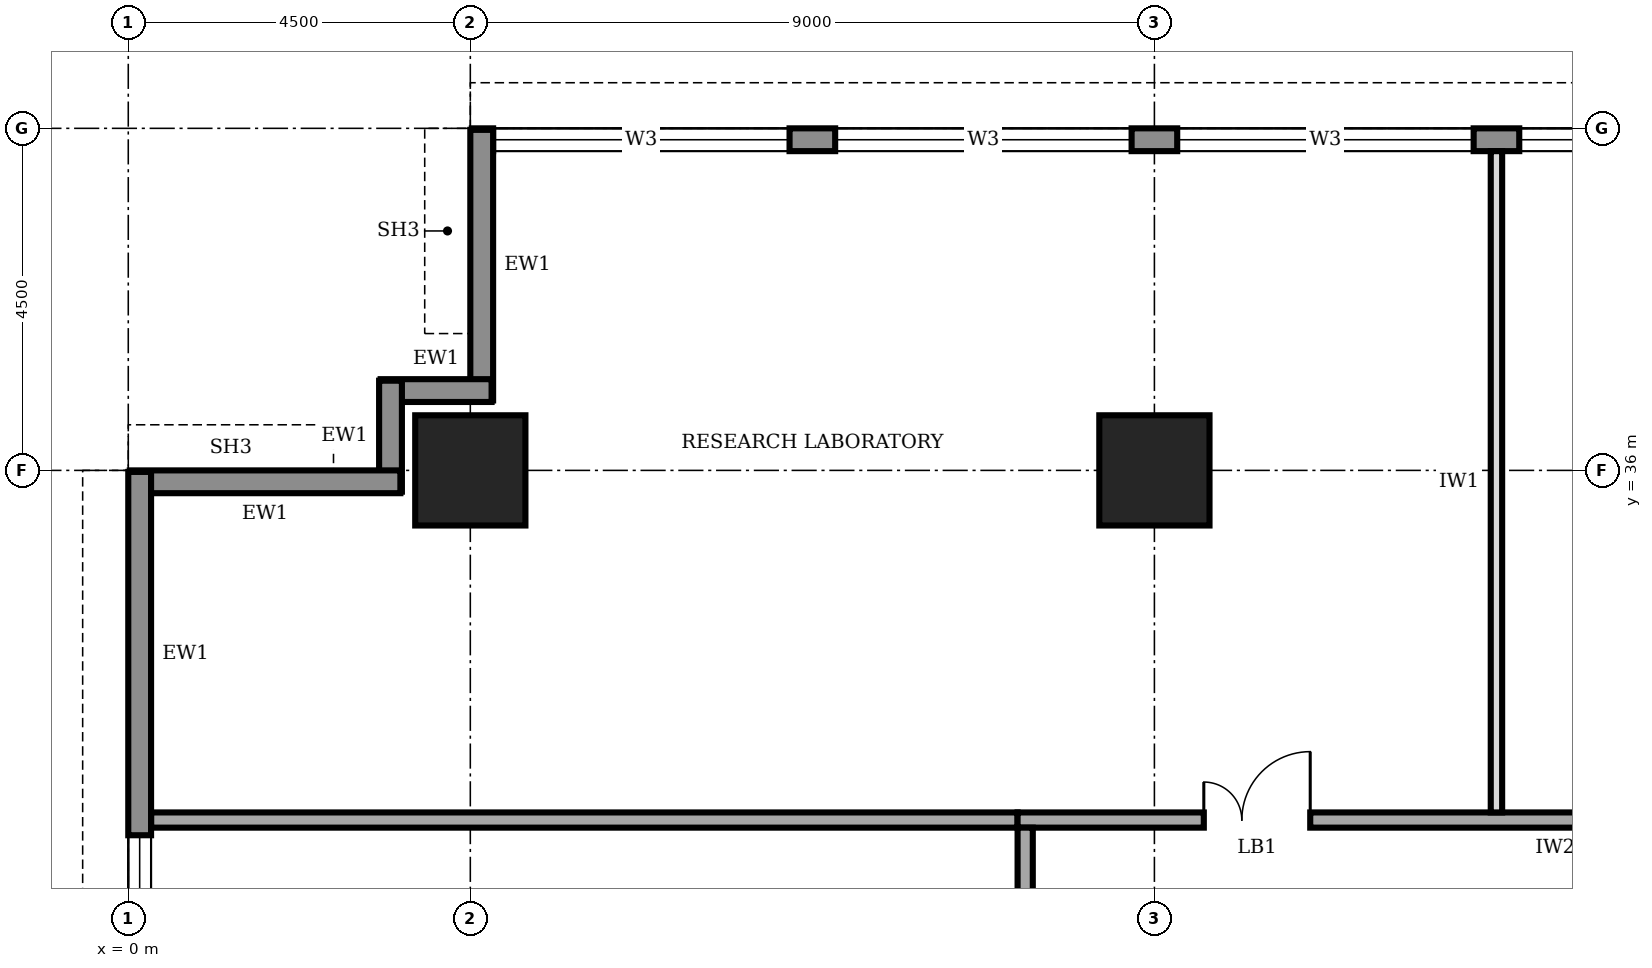
"""IFC4 building model, lengths in metres.
Left out: names, types, materials, properties, quantities, classifications, styles, units other than length and angle.
Written with IfcOpenShell. Run it as: python <this file> out.ifc"""

import sys

from ifc_helpers import new_model, si_unit, direction, frame, frame_2d, origin, origin_2d, place, context, subcontext, project, spatial, rectangle, extrude, element, fill, save


model = new_model("IFC4")
c1 = context("Model", 3, precision=1e-05, world=origin(), true_north=direction((0.0, 1.0)))
c2 = subcontext(c1, "Body", "Model", "MODEL_VIEW")
j1 = project(units=[si_unit("LENGTHUNIT", "METRE"), si_unit("PLANEANGLEUNIT", "RADIAN")], contexts=[c1])
p1 = place(None, origin())
s1 = spatial("IfcSite", under=j1, at=p1, CompositionType="ELEMENT")
p2 = place(p1, origin())
s2 = spatial("IfcBuilding", under=s1, at=p2, CompositionType="ELEMENT")
p3 = place(p2, frame((0.0, 0.0, 265.0)))
s3 = spatial("IfcBuildingStorey", under=s2, at=p3, CompositionType="ELEMENT", Elevation=265.0)
for number, where, z_axis, x_axis in (
    (1, (4.5, 36.0, 0.0), (0.0, 0.0, 1.0), (1.0, 0.0, 0.0)),
    (2, (13.5, 36.0, 0.0), (0.0, 0.0, 1.0), (1.0, 0.0, 0.0)),
):
    element("IfcColumn", number, at=place(p3, frame(where, z_axis=z_axis, x_axis=x_axis)), inside=s3, PredefinedType="COLUMN", context=c2, shape_type="SweptSolid", body=[
        extrude(rectangle(XDim=1.45, YDim=1.45, at=origin_2d()), origin(), (0.0, 0.0, 1.0), 4.0),
    ])
p4 = place(p3, frame((35.98, 40.35, 0.0), z_axis=(0.0, 0.0, 1.0), x_axis=(-1.0, 0.0, 0.0)))
e3 = element("IfcWall", 3, at=p4, inside=s3, PredefinedType="STANDARD", context=c2, shape_type="SweptSolid", body=[
    extrude(rectangle(XDim=31.46, YDim=0.3, at=frame_2d((15.73, 0.0))), origin(), (0.0, 0.0, 1.0), 3.75),
])
p5 = place(p4, frame((27.28, 0.0, 0.95)))
e4 = element("IfcOpeningElement", 4, at=p5, cuts=e3, PredefinedType="OPENING", context=c2, shape_type="SweptSolid", body=[
    extrude(rectangle(XDim=3.9, YDim=1.8, at=frame_2d((1.95, 0.9))), frame((0.0, 0.16, 0.0), z_axis=(0.0, -1.0, 0.0), x_axis=(1.0, 0.0, 0.0)), (0.0, 0.0, 1.0), 0.32),
])
p6 = place(p4, frame((22.78, 0.0, 0.95)))
e5 = element("IfcOpeningElement", 5, at=p6, cuts=e3, PredefinedType="OPENING", context=c2, shape_type="SweptSolid", body=[
    extrude(rectangle(XDim=3.9, YDim=1.8, at=frame_2d((1.95, 0.9))), frame((0.0, 0.16, 0.0), z_axis=(0.0, -1.0, 0.0), x_axis=(1.0, 0.0, 0.0)), (0.0, 0.0, 1.0), 0.32),
])
p7 = place(p4, frame((18.28, 0.0, 0.95)))
e6 = element("IfcOpeningElement", 6, at=p7, cuts=e3, PredefinedType="OPENING", context=c2, shape_type="SweptSolid", body=[
    extrude(rectangle(XDim=3.9, YDim=1.8, at=frame_2d((1.95, 0.9))), frame((0.0, 0.16, 0.0), z_axis=(0.0, -1.0, 0.0), x_axis=(1.0, 0.0, 0.0)), (0.0, 0.0, 1.0), 0.32),
])
p8 = place(p4, frame((13.78, 0.0, 0.95)))
e7 = element("IfcOpeningElement", 7, at=p8, cuts=e3, PredefinedType="OPENING", context=c2, shape_type="SweptSolid", body=[
    extrude(rectangle(XDim=3.9, YDim=1.8, at=frame_2d((1.95, 0.9))), frame((0.0, 0.16, 0.0), z_axis=(0.0, -1.0, 0.0), x_axis=(1.0, 0.0, 0.0)), (0.0, 0.0, 1.0), 0.32),
])
p9 = place(p4, frame((9.28, 0.0, 0.95)))
e8 = element("IfcOpeningElement", 8, at=p9, cuts=e3, PredefinedType="OPENING", context=c2, shape_type="SweptSolid", body=[
    extrude(rectangle(XDim=3.9, YDim=1.8, at=frame_2d((1.95, 0.9))), frame((0.0, 0.16, 0.0), z_axis=(0.0, -1.0, 0.0), x_axis=(1.0, 0.0, 0.0)), (0.0, 0.0, 1.0), 0.32),
])
p10 = place(p4, frame((4.78, 0.0, 0.95)))
e9 = element("IfcOpeningElement", 9, at=p10, cuts=e3, PredefinedType="OPENING", context=c2, shape_type="SweptSolid", body=[
    extrude(rectangle(XDim=3.9, YDim=1.8, at=frame_2d((1.95, 0.9))), frame((0.0, 0.16, 0.0), z_axis=(0.0, -1.0, 0.0), x_axis=(1.0, 0.0, 0.0)), (0.0, 0.0, 1.0), 0.32),
])
p11 = place(p3, frame((4.65, 40.48, 0.0), z_axis=(0.0, 0.0, 1.0), x_axis=(0.0, -1.0, 0.0)))
e10 = element("IfcWall", 10, at=p11, inside=s3, PredefinedType="STANDARD", context=c2, shape_type="SweptSolid", body=[
    extrude(rectangle(XDim=3.56, YDim=0.3, at=frame_2d((1.78, 0.0))), origin(), (0.0, 0.0, 1.0), 2.85),
])
for number, where, z_axis, x_axis in (
    (11, (4.78, 37.05, 0.0), (0.0, 0.0, 1.0), (-1.0, 0.0, 0.0)),
    (12, (3.45, 37.18, 0.0), (0.0, 0.0, 1.0), (0.0, -1.0, 0.0)),
):
    element("IfcWall", number, at=place(p3, frame(where, z_axis=z_axis, x_axis=x_axis)), inside=s3, PredefinedType="STANDARD", context=c2, shape_type="SweptSolid", body=[
        extrude(rectangle(XDim=1.46, YDim=0.3, at=frame_2d((0.73, 0.0))), origin(), (0.0, 0.0, 1.0), 3.75),
    ])
p12 = place(p3, frame((3.58, 35.85, 0.0), z_axis=(0.0, 0.0, 1.0), x_axis=(-1.0, 0.0, 0.0)))
e13 = element("IfcWall", 13, at=p12, inside=s3, PredefinedType="STANDARD", context=c2, shape_type="SweptSolid", body=[
    extrude(rectangle(XDim=3.56, YDim=0.3, at=frame_2d((1.78, 0.0))), origin(), (0.0, 0.0, 1.0), 2.85),
])
p13 = place(p3, frame((0.15, 35.98, 0.0), z_axis=(0.0, 0.0, 1.0), x_axis=(0.0, -1.0, 0.0)))
e14 = element("IfcWall", 14, at=p13, inside=s3, PredefinedType="STANDARD", context=c2, shape_type="SweptSolid", body=[
    extrude(rectangle(XDim=31.46, YDim=0.3, at=frame_2d((15.73, 0.0))), origin(), (0.0, 0.0, 1.0), 3.75),
])
p14 = place(p13, frame((27.28, 0.0, 0.95)))
e15 = element("IfcOpeningElement", 15, at=p14, cuts=e14, PredefinedType="OPENING", context=c2, shape_type="SweptSolid", body=[
    extrude(rectangle(XDim=3.9, YDim=1.8, at=frame_2d((1.95, 0.9))), frame((0.0, 0.16, 0.0), z_axis=(0.0, -1.0, 0.0), x_axis=(1.0, 0.0, 0.0)), (0.0, 0.0, 1.0), 0.32),
])
p15 = place(p13, frame((22.78, 0.0, 0.95)))
e16 = element("IfcOpeningElement", 16, at=p15, cuts=e14, PredefinedType="OPENING", context=c2, shape_type="SweptSolid", body=[
    extrude(rectangle(XDim=3.9, YDim=1.8, at=frame_2d((1.95, 0.9))), frame((0.0, 0.16, 0.0), z_axis=(0.0, -1.0, 0.0), x_axis=(1.0, 0.0, 0.0)), (0.0, 0.0, 1.0), 0.32),
])
p16 = place(p13, frame((18.28, 0.0, 0.95)))
e17 = element("IfcOpeningElement", 17, at=p16, cuts=e14, PredefinedType="OPENING", context=c2, shape_type="SweptSolid", body=[
    extrude(rectangle(XDim=3.9, YDim=1.8, at=frame_2d((1.95, 0.9))), frame((0.0, 0.16, 0.0), z_axis=(0.0, -1.0, 0.0), x_axis=(1.0, 0.0, 0.0)), (0.0, 0.0, 1.0), 0.32),
])
p17 = place(p13, frame((13.78, 0.0, 0.95)))
e18 = element("IfcOpeningElement", 18, at=p17, cuts=e14, PredefinedType="OPENING", context=c2, shape_type="SweptSolid", body=[
    extrude(rectangle(XDim=3.9, YDim=1.8, at=frame_2d((1.95, 0.9))), frame((0.0, 0.16, 0.0), z_axis=(0.0, -1.0, 0.0), x_axis=(1.0, 0.0, 0.0)), (0.0, 0.0, 1.0), 0.32),
])
p18 = place(p13, frame((9.28, 0.0, 0.95)))
e19 = element("IfcOpeningElement", 19, at=p18, cuts=e14, PredefinedType="OPENING", context=c2, shape_type="SweptSolid", body=[
    extrude(rectangle(XDim=3.9, YDim=1.8, at=frame_2d((1.95, 0.9))), frame((0.0, 0.16, 0.0), z_axis=(0.0, -1.0, 0.0), x_axis=(1.0, 0.0, 0.0)), (0.0, 0.0, 1.0), 0.32),
])
p19 = place(p13, frame((4.78, 0.0, 0.95)))
e20 = element("IfcOpeningElement", 20, at=p19, cuts=e14, PredefinedType="OPENING", context=c2, shape_type="SweptSolid", body=[
    extrude(rectangle(XDim=3.9, YDim=1.8, at=frame_2d((1.95, 0.9))), frame((0.0, 0.16, 0.0), z_axis=(0.0, -1.0, 0.0), x_axis=(1.0, 0.0, 0.0)), (0.0, 0.0, 1.0), 0.32),
])
p20 = place(p3, frame((28.6, 31.4, 0.0), z_axis=(0.0, 0.0, 1.0), x_axis=(-1.0, 0.0, 0.0)))
e21 = element("IfcWall", 21, at=p20, inside=s3, PredefinedType="SOLIDWALL", context=c2, shape_type="SweptSolid", body=[
    extrude(rectangle(XDim=16.9, YDim=0.2, at=frame_2d((8.45, 0.0))), origin(), (0.0, 0.0, 1.0), 3.75),
])
p21 = place(p20, frame((13.05, 0.0, 0.0)))
e22 = element("IfcOpeningElement", 22, at=p21, cuts=e21, PredefinedType="OPENING", context=c2, shape_type="SweptSolid", body=[
    extrude(rectangle(XDim=1.4, YDim=2.1, at=frame_2d((0.7, 1.05))), frame((0.0, 0.11, 0.0), z_axis=(0.0, -1.0, 0.0), x_axis=(1.0, 0.0, 0.0)), (0.0, 0.0, 1.0), 0.22),
])
p22 = place(p20, frame((5.6, 0.0, 0.0)))
e23 = element("IfcOpeningElement", 23, at=p22, cuts=e21, PredefinedType="OPENING", context=c2, shape_type="SweptSolid", body=[
    extrude(rectangle(XDim=1.0, YDim=2.1, at=frame_2d((0.5, 1.05))), frame((0.0, 0.11, 0.0), z_axis=(0.0, -1.0, 0.0), x_axis=(1.0, 0.0, 0.0)), (0.0, 0.0, 1.0), 0.22),
])
p23 = place(p20, frame((0.275, 0.0, 0.0)))
e24 = element("IfcOpeningElement", 24, at=p23, cuts=e21, PredefinedType="OPENING", context=c2, shape_type="SweptSolid", body=[
    extrude(rectangle(XDim=1.0, YDim=2.1, at=frame_2d((0.5, 1.05))), frame((0.0, 0.11, 0.0), z_axis=(0.0, -1.0, 0.0), x_axis=(1.0, 0.0, 0.0)), (0.0, 0.0, 1.0), 0.22),
])
p24 = place(p3, frame((11.8, 31.3, 0.0), z_axis=(0.0, 0.0, 1.0), x_axis=(0.0, -1.0, 0.0)))
e25 = element("IfcWall", 25, at=p24, inside=s3, PredefinedType="SOLIDWALL", context=c2, shape_type="SweptSolid", body=[
    extrude(rectangle(XDim=23.8, YDim=0.2, at=frame_2d((11.9, 0.0))), origin(), (0.0, 0.0, 1.0), 3.75),
])
p25 = place(p24, frame((20.3, 0.0, 0.0)))
e26 = element("IfcOpeningElement", 26, at=p25, cuts=e25, PredefinedType="OPENING", context=c2, shape_type="SweptSolid", body=[
    extrude(rectangle(XDim=1.0, YDim=2.1, at=frame_2d((0.5, 1.05))), frame((0.0, 0.11, 0.0), z_axis=(0.0, -1.0, 0.0), x_axis=(1.0, 0.0, 0.0)), (0.0, 0.0, 1.0), 0.22),
])
p26 = place(p24, frame((16.2, 0.0, 0.0)))
e27 = element("IfcOpeningElement", 27, at=p26, cuts=e25, PredefinedType="OPENING", context=c2, shape_type="SweptSolid", body=[
    extrude(rectangle(XDim=1.0, YDim=2.1, at=frame_2d((0.5, 1.05))), frame((0.0, 0.11, 0.0), z_axis=(0.0, -1.0, 0.0), x_axis=(1.0, 0.0, 0.0)), (0.0, 0.0, 1.0), 0.22),
])
p27 = place(p24, frame((13.2, 0.0, 0.0)))
e28 = element("IfcOpeningElement", 28, at=p27, cuts=e25, PredefinedType="OPENING", context=c2, shape_type="SweptSolid", body=[
    extrude(rectangle(XDim=0.9, YDim=2.1, at=frame_2d((0.45, 1.05))), frame((0.0, 0.11, 0.0), z_axis=(0.0, -1.0, 0.0), x_axis=(1.0, 0.0, 0.0)), (0.0, 0.0, 1.0), 0.22),
])
p28 = place(p24, frame((10.15, 0.0, 0.0)))
e29 = element("IfcOpeningElement", 29, at=p28, cuts=e25, PredefinedType="OPENING", context=c2, shape_type="SweptSolid", body=[
    extrude(rectangle(XDim=0.9, YDim=2.1, at=frame_2d((0.45, 1.05))), frame((0.0, 0.11, 0.0), z_axis=(0.0, -1.0, 0.0), x_axis=(1.0, 0.0, 0.0)), (0.0, 0.0, 1.0), 0.22),
])
p29 = place(p24, frame((5.45, 0.0, 0.0)))
e30 = element("IfcOpeningElement", 30, at=p29, cuts=e25, PredefinedType="OPENING", context=c2, shape_type="SweptSolid", body=[
    extrude(rectangle(XDim=0.9, YDim=2.1, at=frame_2d((0.45, 1.05))), frame((0.0, 0.11, 0.0), z_axis=(0.0, -1.0, 0.0), x_axis=(1.0, 0.0, 0.0)), (0.0, 0.0, 1.0), 0.22),
])
p30 = place(p24, frame((8.0, 0.0, 0.0)))
e31 = element("IfcOpeningElement", 31, at=p30, cuts=e25, PredefinedType="OPENING", context=c2, shape_type="SweptSolid", body=[
    extrude(rectangle(XDim=1.0, YDim=2.1, at=frame_2d((0.5, 1.05))), frame((0.0, 0.11, 0.0), z_axis=(0.0, -1.0, 0.0), x_axis=(1.0, 0.0, 0.0)), (0.0, 0.0, 1.0), 0.22),
])
p31 = place(p24, frame((1.55, 0.0, 0.0)))
e32 = element("IfcOpeningElement", 32, at=p31, cuts=e25, PredefinedType="OPENING", context=c2, shape_type="SweptSolid", body=[
    extrude(rectangle(XDim=1.0, YDim=2.1, at=frame_2d((0.5, 1.05))), frame((0.0, 0.11, 0.0), z_axis=(0.0, -1.0, 0.0), x_axis=(1.0, 0.0, 0.0)), (0.0, 0.0, 1.0), 0.22),
])
p32 = place(p3, frame((0.3, 31.4, 0.0), z_axis=(0.0, 0.0, 1.0), x_axis=(1.0, 0.0, 0.0)))
e33 = element("IfcWall", 33, at=p32, inside=s3, PredefinedType="SOLIDWALL", context=c2, shape_type="SweptSolid", body=[
    extrude(rectangle(XDim=11.4, YDim=0.2, at=frame_2d((5.7, 0.0))), origin(), (0.0, 0.0, 1.0), 3.75),
])
p33 = place(p3, frame((18.0, 31.5, 0.0), z_axis=(0.0, 0.0, 1.0), x_axis=(0.0, 1.0, 0.0)))
e34 = element("IfcWall", 34, at=p33, inside=s3, PredefinedType="PARTITIONING", context=c2, shape_type="SweptSolid", body=[
    extrude(rectangle(XDim=8.7, YDim=0.15, at=frame_2d((4.35, 0.0))), origin(), (0.0, 0.0, 1.0), 3.75),
])
p34 = place(p5, origin())
e35 = element("IfcWindow", 35, at=p34, inside=s3, PartitioningType="SINGLE_PANEL", PredefinedType="WINDOW", context=c2, shape_type="SweptSolid", body=[
    extrude(rectangle(XDim=3.9, YDim=1.8, at=frame_2d((1.95, 0.9))), frame((0.0, 0.03, 0.0), z_axis=(0.0, -1.0, 0.0), x_axis=(1.0, 0.0, 0.0)), (0.0, 0.0, 1.0), 0.06),
])
fill(e4, e35)
p35 = place(p6, origin())
e36 = element("IfcWindow", 36, at=p35, inside=s3, PartitioningType="SINGLE_PANEL", PredefinedType="WINDOW", context=c2, shape_type="SweptSolid", body=[
    extrude(rectangle(XDim=3.9, YDim=1.8, at=frame_2d((1.95, 0.9))), frame((0.0, 0.03, 0.0), z_axis=(0.0, -1.0, 0.0), x_axis=(1.0, 0.0, 0.0)), (0.0, 0.0, 1.0), 0.06),
])
fill(e5, e36)
p36 = place(p7, origin())
e37 = element("IfcWindow", 37, at=p36, inside=s3, PartitioningType="SINGLE_PANEL", PredefinedType="WINDOW", context=c2, shape_type="SweptSolid", body=[
    extrude(rectangle(XDim=3.9, YDim=1.8, at=frame_2d((1.95, 0.9))), frame((0.0, 0.03, 0.0), z_axis=(0.0, -1.0, 0.0), x_axis=(1.0, 0.0, 0.0)), (0.0, 0.0, 1.0), 0.06),
])
fill(e6, e37)
p37 = place(p8, origin())
e38 = element("IfcWindow", 38, at=p37, inside=s3, PartitioningType="SINGLE_PANEL", PredefinedType="WINDOW", context=c2, shape_type="SweptSolid", body=[
    extrude(rectangle(XDim=3.9, YDim=1.8, at=frame_2d((1.95, 0.9))), frame((0.0, 0.03, 0.0), z_axis=(0.0, -1.0, 0.0), x_axis=(1.0, 0.0, 0.0)), (0.0, 0.0, 1.0), 0.06),
])
fill(e7, e38)
p38 = place(p19, origin())
e39 = element("IfcWindow", 39, at=p38, inside=s3, PartitioningType="SINGLE_PANEL", PredefinedType="WINDOW", context=c2, shape_type="SweptSolid", body=[
    extrude(rectangle(XDim=3.9, YDim=1.8, at=frame_2d((1.95, 0.9))), frame((0.0, 0.03, 0.0), z_axis=(0.0, -1.0, 0.0), x_axis=(1.0, 0.0, 0.0)), (0.0, 0.0, 1.0), 0.06),
])
fill(e20, e39)
p39 = place(p21, frame((1.4, 0.0, 0.0), z_axis=(0.0, 0.0, 1.0), x_axis=(-1.0, 0.0, 0.0)))
e40 = element("IfcDoor", 40, at=p39, inside=s3, OperationType="DOUBLE_DOOR_SINGLE_SWING", PredefinedType="DOOR", context=c2, shape_type="SweptSolid", body=[
    extrude(rectangle(XDim=1.4, YDim=2.1, at=frame_2d((0.7, 1.05))), frame((0.0, 0.025, 0.0), z_axis=(0.0, -1.0, 0.0), x_axis=(1.0, 0.0, 0.0)), (0.0, 0.0, 1.0), 0.05),
])
fill(e22, e40)
save(model, sys.argv[1])
